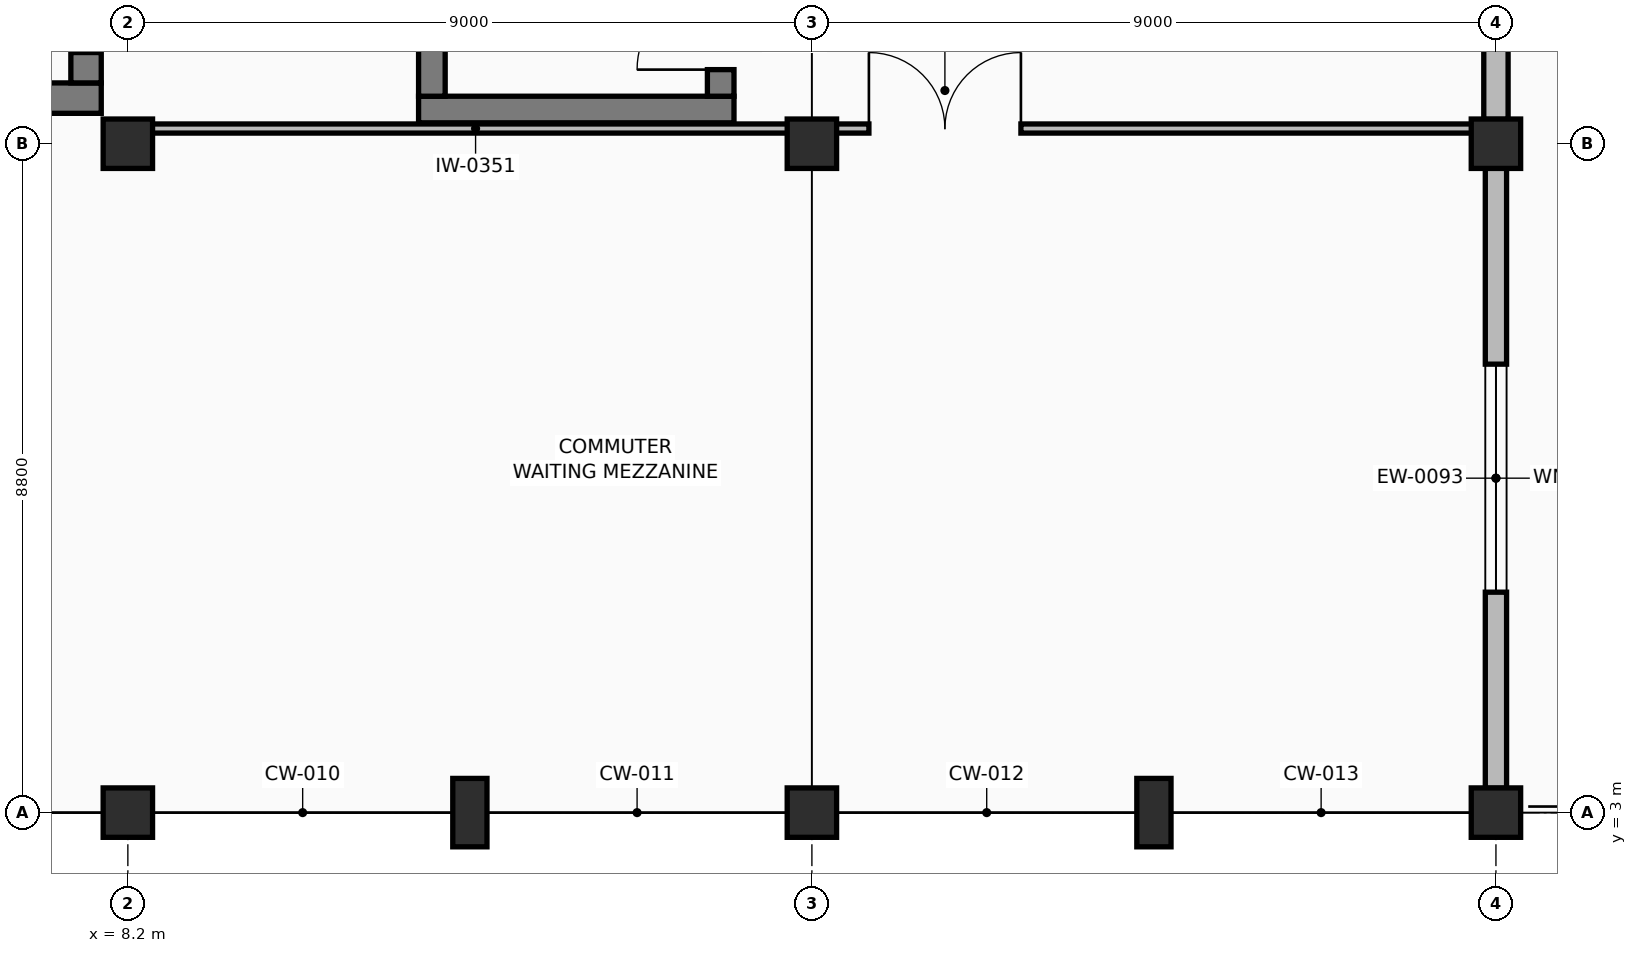
"""IFC4 building model, lengths in metres.
Left out: names, types, materials, properties, quantities, classifications, styles, units other than length and angle.
Written with IfcOpenShell. Run it as: python <this file> out.ifc"""

import sys

from ifc_helpers import new_model, si_unit, direction, frame, frame_2d, origin, origin_2d, place, context, subcontext, project, spatial, rectangle, extrude, element, fill, save


model = new_model("IFC4")
c1 = context("Model", 3, precision=1e-05, world=origin(), true_north=direction((0.0, 1.0)))
c2 = subcontext(c1, "Body", "Model", "MODEL_VIEW")
j1 = project(units=[si_unit("LENGTHUNIT", "METRE"), si_unit("PLANEANGLEUNIT", "RADIAN")], contexts=[c1])
p1 = place(None, origin())
s1 = spatial("IfcSite", under=j1, at=p1, CompositionType="ELEMENT")
p2 = place(p1, origin())
s2 = spatial("IfcBuilding", under=s1, at=p2, CompositionType="ELEMENT")
p3 = place(p2, frame((0.0, 0.0, 4.8)))
s3 = spatial("IfcBuildingStorey", under=s2, at=p3, CompositionType="ELEMENT", Elevation=4.8)
for number, where, z_axis, x_axis in (
    (1, (8.2, 3.0, 0.0), (0.0, 0.0, 1.0), (1.0, 0.0, 0.0)),
    (2, (8.2, 11.8, 0.0), (0.0, 0.0, 1.0), (1.0, 0.0, 0.0)),
    (3, (17.2, 3.0, 0.0), (0.0, 0.0, 1.0), (1.0, 0.0, 0.0)),
    (4, (17.2, 11.8, 0.0), (0.0, 0.0, 1.0), (1.0, 0.0, 0.0)),
    (5, (26.2, 3.0, 0.0), (0.0, 0.0, 1.0), (1.0, 0.0, 0.0)),
    (6, (26.2, 11.8, 0.0), (0.0, 0.0, 1.0), (1.0, 0.0, 0.0)),
):
    element("IfcColumn", number, at=place(p3, frame(where, z_axis=z_axis, x_axis=x_axis)), inside=s3, PredefinedType="COLUMN", context=c2, shape_type="SweptSolid", body=[
        extrude(rectangle(XDim=0.65, YDim=0.65, at=origin_2d()), origin(), (0.0, 0.0, 1.0), 4.8),
    ])
for number, where, z_axis, x_axis in (
    (7, (12.7, 3.0, 0.0), (0.0, 0.0, 1.0), (1.0, 0.0, 0.0)),
    (8, (21.7, 3.0, 0.0), (0.0, 0.0, 1.0), (1.0, 0.0, 0.0)),
):
    element("IfcColumn", number, at=place(p3, frame(where, z_axis=z_axis, x_axis=x_axis)), inside=s3, PredefinedType="PILASTER", context=c2, shape_type="SweptSolid", body=[
        extrude(rectangle(XDim=0.45, YDim=0.9, at=origin_2d()), origin(), (0.0, 0.0, 1.0), 4.8),
    ])
p4 = place(p3, frame((26.2, 3.32, 0.0), z_axis=(0.0, 0.0, 1.0), x_axis=(0.0, 1.0, 0.0)))
e9 = element("IfcWall", 9, at=p4, inside=s3, PredefinedType="SOLIDWALL", context=c2, shape_type="SweptSolid", body=[
    extrude(rectangle(XDim=8.16, YDim=0.28, at=frame_2d((4.08, 0.0))), origin(), (0.0, 0.0, 1.0), 3.61),
])
p5 = place(p4, frame((2.58, 0.0, 0.9)))
e10 = element("IfcOpeningElement", 10, at=p5, cuts=e9, PredefinedType="OPENING", context=c2, shape_type="SweptSolid", body=[
    extrude(rectangle(XDim=3.0, YDim=1.55, at=frame_2d((1.5, 0.775))), frame((0.0, 0.15, 0.0), z_axis=(0.0, -1.0, 0.0), x_axis=(1.0, 0.0, 0.0)), (0.0, 0.0, 1.0), 0.3),
])
p6 = place(p3, frame((26.2, 12.12, 0.0), z_axis=(0.0, 0.0, 1.0), x_axis=(0.0, 1.0, 0.0)))
e11 = element("IfcWall", 11, at=p6, inside=s3, PredefinedType="SOLIDWALL", context=c2, shape_type="SweptSolid", body=[
    extrude(rectangle(XDim=8.16, YDim=0.32, at=frame_2d((4.08, 0.0))), origin(), (0.0, 0.0, 1.0), 3.61),
])
p7 = place(p6, frame((3.28, 0.0, 0.0)))
e12 = element("IfcOpeningElement", 12, at=p7, cuts=e11, PredefinedType="OPENING", context=c2, shape_type="SweptSolid", body=[
    extrude(rectangle(XDim=1.6, YDim=2.3, at=frame_2d((0.8, 1.15))), frame((0.0, 0.17, 0.0), z_axis=(0.0, -1.0, 0.0), x_axis=(1.0, 0.0, 0.0)), (0.0, 0.0, 1.0), 0.34),
])
p8 = place(p3, frame((3.45, 12.4, 0.0), z_axis=(0.0, 0.0, 1.0), x_axis=(1.0, 0.0, 0.0)))
e13 = element("IfcWall", 13, at=p8, inside=s3, PredefinedType="SHEAR", context=c2, shape_type="SweptSolid", body=[
    extrude(rectangle(XDim=4.4, YDim=0.4, at=frame_2d((2.2, 0.0))), origin(), (0.0, 0.0, 1.0), 4.49),
])
p9 = place(p3, frame((7.65, 12.6, 0.0), z_axis=(0.0, 0.0, 1.0), x_axis=(0.0, 1.0, 0.0)))
e14 = element("IfcWall", 14, at=p9, inside=s3, PredefinedType="SHEAR", context=c2, shape_type="SweptSolid", body=[
    extrude(rectangle(XDim=7.65, YDim=0.4, at=frame_2d((3.825, 0.0))), origin(), (0.0, 0.0, 1.0), 4.49),
])
p10 = place(p9, frame((0.4, 0.0, 0.0)))
e15 = element("IfcOpeningElement", 15, at=p10, cuts=e14, PredefinedType="OPENING", context=c2, shape_type="SweptSolid", body=[
    extrude(rectangle(XDim=1.1, YDim=2.2, at=frame_2d((0.55, 1.1))), frame((0.0, 0.21, 0.0), z_axis=(0.0, -1.0, 0.0), x_axis=(1.0, 0.0, 0.0)), (0.0, 0.0, 1.0), 0.42),
])
p11 = place(p3, frame((12.025, 12.25, 0.0), z_axis=(0.0, 0.0, 1.0), x_axis=(1.0, 0.0, 0.0)))
e16 = element("IfcWall", 16, at=p11, inside=s3, PredefinedType="SHEAR", context=c2, shape_type="SweptSolid", body=[
    extrude(rectangle(XDim=4.15, YDim=0.35, at=frame_2d((2.075, 0.0))), origin(), (0.0, 0.0, 1.0), 4.49),
])
p12 = place(p3, frame((16.0, 12.425, 0.0), z_axis=(0.0, 0.0, 1.0), x_axis=(0.0, 1.0, 0.0)))
e17 = element("IfcWall", 17, at=p12, inside=s3, PredefinedType="SHEAR", context=c2, shape_type="SweptSolid", body=[
    extrude(rectangle(XDim=7.6, YDim=0.35, at=frame_2d((3.8, 0.0))), origin(), (0.0, 0.0, 1.0), 4.49),
])
p13 = place(p12, frame((0.35, 0.0, 0.0)))
e18 = element("IfcOpeningElement", 18, at=p13, cuts=e17, PredefinedType="OPENING", context=c2, shape_type="SweptSolid", body=[
    extrude(rectangle(XDim=1.1, YDim=2.2, at=frame_2d((0.55, 1.1))), frame((0.0, 0.185, 0.0), z_axis=(0.0, -1.0, 0.0), x_axis=(1.0, 0.0, 0.0)), (0.0, 0.0, 1.0), 0.37),
])
p14 = place(p3, frame((12.2, 20.025, 0.0), z_axis=(0.0, 0.0, 1.0), x_axis=(0.0, -1.0, 0.0)))
e19 = element("IfcWall", 19, at=p14, inside=s3, PredefinedType="SHEAR", context=c2, shape_type="SweptSolid", body=[
    extrude(rectangle(XDim=7.6, YDim=0.35, at=frame_2d((3.8, 0.0))), origin(), (0.0, 0.0, 1.0), 4.49),
])
p15 = place(p3, frame((8.2, 12.0, 0.0), z_axis=(0.0, 0.0, 1.0), x_axis=(1.0, 0.0, 0.0)))
e20 = element("IfcWall", 20, at=p15, inside=s3, PredefinedType="PARTITIONING", context=c2, shape_type="SweptSolid", body=[
    extrude(rectangle(XDim=17.8, YDim=0.12, at=frame_2d((8.9, 0.0))), origin(), (0.0, 0.0, 1.0), 3.6),
])
p16 = place(p15, frame((9.75, 0.0, 0.0)))
e21 = element("IfcOpeningElement", 21, at=p16, cuts=e20, PredefinedType="OPENING", context=c2, shape_type="SweptSolid", body=[
    extrude(rectangle(XDim=2.0, YDim=2.4, at=frame_2d((1.0, 1.2))), frame((0.0, 0.07, 0.0), z_axis=(0.0, -1.0, 0.0), x_axis=(1.0, 0.0, 0.0)), (0.0, 0.0, 1.0), 0.14),
])
p17 = place(p5, origin())
e22 = element("IfcWindow", 22, at=p17, inside=s3, PartitioningType="SINGLE_PANEL", PredefinedType="WINDOW", context=c2, shape_type="SweptSolid", body=[
    extrude(rectangle(XDim=3.0, YDim=1.55, at=frame_2d((1.5, 0.775))), frame((0.0, 0.03, 0.0), z_axis=(0.0, -1.0, 0.0), x_axis=(1.0, 0.0, 0.0)), (0.0, 0.0, 1.0), 0.06),
])
fill(e10, e22)
p18 = place(p13, origin())
e23 = element("IfcDoor", 23, at=p18, inside=s3, OperationType="SINGLE_SWING_LEFT", PredefinedType="DOOR", context=c2, shape_type="SweptSolid", body=[
    extrude(rectangle(XDim=1.1, YDim=2.2, at=frame_2d((0.55, 1.1))), frame((0.0, 0.025, 0.0), z_axis=(0.0, -1.0, 0.0), x_axis=(1.0, 0.0, 0.0)), (0.0, 0.0, 1.0), 0.05),
])
fill(e18, e23)
p19 = place(p16, origin())
e24 = element("IfcDoor", 24, at=p19, inside=s3, OperationType="DOUBLE_DOOR_SINGLE_SWING", PredefinedType="DOOR", context=c2, shape_type="SweptSolid", body=[
    extrude(rectangle(XDim=2.0, YDim=2.4, at=frame_2d((1.0, 1.2))), frame((0.0, 0.025, 0.0), z_axis=(0.0, -1.0, 0.0), x_axis=(1.0, 0.0, 0.0)), (0.0, 0.0, 1.0), 0.05),
])
fill(e21, e24)
save(model, sys.argv[1])
